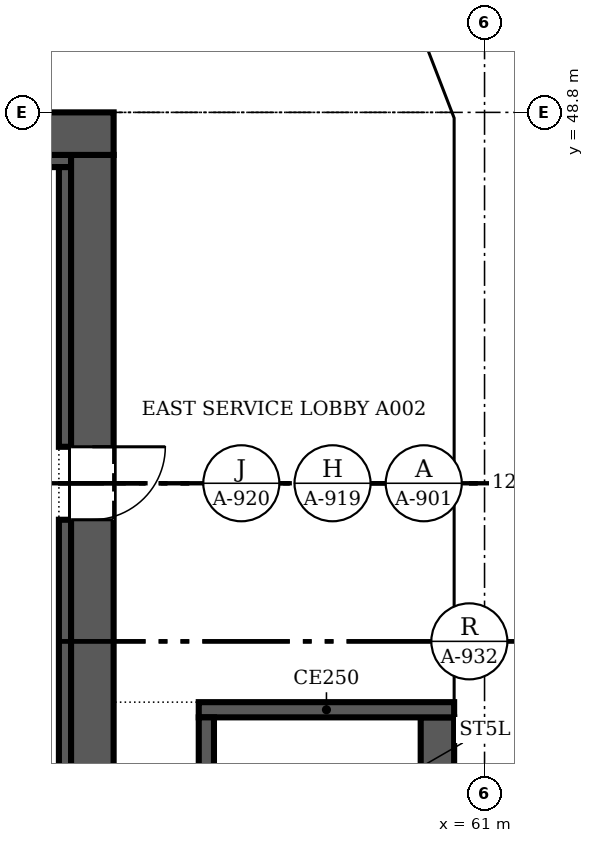
"""IFC4 building model, lengths in metres.
Left out: names, types, materials, properties, quantities, classifications, styles, units other than length and angle.
Written with IfcOpenShell. Run it as: python <this file> out.ifc"""

import sys

from ifc_helpers import new_model, si_unit, direction, frame, frame_2d, origin, place, context, subcontext, project, spatial, polyline, rectangle, outline, extrude, faceted_brep, source, transform, mapped, element, fill, save


model = new_model("IFC4")
c1 = context("Model", 3, precision=1e-05, world=origin(), true_north=direction((0.0, 1.0)))
c2 = subcontext(c1, "Body", "Model", "MODEL_VIEW")
j1 = project(units=[si_unit("LENGTHUNIT", "METRE"), si_unit("PLANEANGLEUNIT", "RADIAN")], contexts=[c1])
p1 = place(None, origin())
s1 = spatial("IfcSite", under=j1, at=p1, CompositionType="ELEMENT")
p2 = place(p1, origin())
s2 = spatial("IfcBuilding", under=s1, at=p2, CompositionType="ELEMENT")
p3 = place(p2, frame((0.0, 0.0, 124.0)))
s3 = spatial("IfcBuildingStorey", under=s2, at=p3, CompositionType="ELEMENT", Elevation=124.0)
m1 = source(origin(), c2, "Body", "Brep", [
    faceted_brep([(3.05, -0.25, 0.0), (6.1, -0.25, 3.8), (6.1, -0.25, 3.8), (3.05, -0.25, 7.6), (0.0, -0.25, 3.8), (0.0, 0.25, 3.8), (3.05, 0.25, 7.6), (6.1, 0.25, 3.8), (6.1, 0.25, 3.8), (3.05, 0.25, 0.0)], [[[0, 1, 2, 3, 4]], [[5, 6, 7, 8, 9]], [[9, 8, 1, 0]], [[7, 6, 3, 2]], [[6, 5, 4, 3]], [[5, 9, 0, 4]], [[1, 8, 7, 2]]]),
])
p4 = place(p3, frame((60.75, 33.55, -3.8), z_axis=(0.0, 0.0, 1.0), x_axis=(0.0, 1.0, 0.0)))
e1 = element("IfcWall", 1, at=p4, inside=s3, PredefinedType="SOLIDWALL", context=c2, shape_type="MappedRepresentation", body=[
    mapped(m1, transform((0.0, 0.0, 0.0), scale=1.0)),
])
m2 = source(origin(), c2, "Body", "SweptSolid", [
    extrude(outline(polyline([(3.05, 0.399), (5.78, 3.8), (3.05, 7.201), (0.321, 3.8), (3.05, 0.399)])), frame((0.0, 0.26, 0.0), z_axis=(0.0, -1.0, 0.0), x_axis=(1.0, 0.0, 0.0)), (0.0, 0.0, 1.0), 0.52),
])
p5 = place(p4, origin())
e2 = element("IfcOpeningElement", 2, at=p5, cuts=e1, PredefinedType="OPENING", context=c2, shape_type="MappedRepresentation", body=[
    mapped(m2, transform((0.0, 0.0, 0.0), scale=1.0)),
])
m3 = source(origin(), c2, "Body", "SweptSolid", [
    extrude(outline(polyline([(3.05, 0.0), (6.1, 3.8), (3.05, 7.6), (0.0, 3.8), (3.05, 0.0)])), frame((0.0, 0.25, 0.0), z_axis=(0.0, -1.0, 0.0), x_axis=(1.0, 0.0, 0.0)), (0.0, 0.0, 1.0), 0.5),
])
p6 = place(p3, frame((60.75, 39.65, -3.8), z_axis=(0.0, 0.0, 1.0), x_axis=(0.0, 1.0, 0.0)))
e3 = element("IfcWall", 3, at=p6, inside=s3, PredefinedType="SOLIDWALL", context=c2, shape_type="MappedRepresentation", body=[
    mapped(m3, transform((0.0, 0.0, 0.0), scale=1.0)),
])
p7 = place(p6, origin())
e4 = element("IfcOpeningElement", 4, at=p7, cuts=e3, PredefinedType="OPENING", context=c2, shape_type="MappedRepresentation", body=[
    mapped(m2, transform((0.0, 0.0, 0.0), scale=1.0)),
])
m4 = source(origin(), c2, "Body", "Brep", [
    faceted_brep([(3.003, -0.25, 0.0), (3.05, -0.25, 0.06), (3.05, -0.25, 7.54), (3.003, -0.25, 7.6), (0.0, -0.25, 3.8), (0.0, 0.25, 3.8), (2.957, 0.25, 7.541), (2.957, 0.25, 0.059), (3.003, 0.0, 0.0), (3.003, 0.0, 7.6)], [[[0, 1, 2, 3, 4]], [[5, 6, 7]], [[1, 0, 8]], [[9, 3, 2]], [[6, 5, 4, 3, 9]], [[5, 7, 8, 0, 4]], [[1, 8, 7, 6, 9, 2]]]),
])
p8 = place(p3, frame((60.75, 45.75, -3.8), z_axis=(0.0, 0.0, 1.0), x_axis=(0.0, 1.0, 0.0)))
e5 = element("IfcWall", 5, at=p8, inside=s3, PredefinedType="SOLIDWALL", context=c2, shape_type="MappedRepresentation", body=[
    mapped(m4, transform((0.0, 0.0, 0.0), scale=1.0)),
])
m5 = source(origin(), c2, "Body", "SweptSolid", [
    extrude(outline(polyline([(2.803, 6.944), (0.319, 3.8), (2.803, 0.656), (2.803, 6.944)])), frame((0.0, 0.26, 0.0), z_axis=(0.0, -1.0, 0.0), x_axis=(1.0, 0.0, 0.0)), (0.0, 0.0, 1.0), 0.52),
])
p9 = place(p8, origin())
e6 = element("IfcOpeningElement", 6, at=p9, cuts=e5, PredefinedType="OPENING", context=c2, shape_type="MappedRepresentation", body=[
    mapped(m5, transform((0.0, 0.0, 0.0), scale=1.0)),
])
m6 = source(origin(), c2, "Body", "Brep", [
    faceted_brep([(0.047, -0.25, 0.0), (2.997, -0.25, 3.8), (0.047, -0.25, 7.6), (0.0, -0.25, 7.541), (0.0, -0.25, 0.059), (0.093, 0.25, 7.54), (2.944, 0.25, 3.868), (2.944, 0.25, 3.732), (0.093, 0.25, 0.06), (2.997, 0.0, 3.8), (0.047, 0.0, 0.0), (0.047, 0.0, 7.6)], [[[0, 1, 2, 3, 4]], [[5, 6, 7, 8]], [[8, 7, 9, 1, 0, 10]], [[6, 5, 11, 2, 1, 9]], [[3, 2, 11]], [[10, 0, 4]], [[8, 10, 4, 3, 11, 5]], [[9, 7, 6]]]),
])
p10 = place(p3, frame((60.767, 48.71, -3.8), z_axis=(0.0, 0.0, 1.0), x_axis=(-0.359901446078, 0.932990326376, 0.0)))
e7 = element("IfcWall", 7, at=p10, inside=s3, PredefinedType="SOLIDWALL", context=c2, shape_type="MappedRepresentation", body=[
    mapped(m6, transform((0.0, 0.0, 0.0), scale=1.0)),
])
m7 = source(origin(), c2, "Body", "SweptSolid", [
    extrude(outline(polyline([(0.247, 0.665), (2.681, 3.8), (0.247, 6.935), (0.247, 0.665)])), frame((0.0, 0.26, 0.0), z_axis=(0.0, -1.0, 0.0), x_axis=(1.0, 0.0, 0.0)), (0.0, 0.0, 1.0), 0.52),
])
p11 = place(p10, origin())
e8 = element("IfcOpeningElement", 8, at=p11, cuts=e7, PredefinedType="OPENING", context=c2, shape_type="MappedRepresentation", body=[
    mapped(m7, transform((0.0, 0.0, 0.0), scale=1.0)),
])
p12 = place(p2, frame((0.0, 0.0, 127.8)))
s4 = spatial("IfcBuildingStorey", under=s2, at=p12, CompositionType="ELEMENT", Elevation=127.8)
p13 = place(p12, frame((60.75, 36.6, -3.8), z_axis=(0.0, 0.0, 1.0), x_axis=(0.0, 1.0, 0.0)))
e9 = element("IfcWall", 9, at=p13, inside=s4, PredefinedType="SOLIDWALL", context=c2, shape_type="MappedRepresentation", body=[
    mapped(m1, transform((0.0, 0.0, 0.0), scale=1.0)),
])
p14 = place(p13, origin())
e10 = element("IfcOpeningElement", 10, at=p14, cuts=e9, PredefinedType="OPENING", context=c2, shape_type="MappedRepresentation", body=[
    mapped(m2, transform((0.0, 0.0, 0.0), scale=1.0)),
])
m8 = source(origin(), c2, "Body", "Brep", [
    faceted_brep([(3.05, -0.25, 0.0), (6.053, -0.25, 3.8), (3.05, -0.25, 7.6), (0.0, -0.25, 3.8), (0.0, 0.25, 3.8), (3.05, 0.25, 7.6), (6.007, 0.25, 3.859), (6.007, 0.25, 3.741), (3.05, 0.25, 0.0), (6.053, 0.0, 3.8)], [[[0, 1, 2, 3]], [[4, 5, 6, 7, 8]], [[8, 7, 9, 1, 0]], [[6, 5, 2, 1, 9]], [[5, 4, 3, 2]], [[4, 8, 0, 3]], [[9, 7, 6]]]),
])
p15 = place(p12, frame((60.75, 42.7, -3.8), z_axis=(0.0, 0.0, 1.0), x_axis=(0.0, 1.0, 0.0)))
e11 = element("IfcWall", 11, at=p15, inside=s4, PredefinedType="SOLIDWALL", context=c2, shape_type="MappedRepresentation", body=[
    mapped(m8, transform((0.0, 0.0, 0.0), scale=1.0)),
])
m9 = source(origin(), c2, "Body", "SweptSolid", [
    extrude(outline(polyline([(3.049, 0.401), (5.735, 3.8), (3.049, 7.199), (0.321, 3.8), (3.049, 0.401)])), frame((0.0, 0.26, 0.0), z_axis=(0.0, -1.0, 0.0), x_axis=(1.0, 0.0, 0.0)), (0.0, 0.0, 1.0), 0.52),
])
p16 = place(p15, origin())
e12 = element("IfcOpeningElement", 12, at=p16, cuts=e11, PredefinedType="OPENING", context=c2, shape_type="MappedRepresentation", body=[
    mapped(m9, transform((0.0, 0.0, 0.0), scale=1.0)),
])
m10 = source(origin(), c2, "Body", "Brep", [
    faceted_brep([(2.95, -0.25, 0.0), (3.003, -0.25, 0.068), (3.003, -0.25, 7.532), (2.95, -0.25, 7.6), (0.0, -0.25, 3.8), (0.047, 0.25, 3.86), (2.898, 0.25, 7.532), (2.898, 0.25, 0.068), (0.047, 0.25, 3.74), (2.95, 0.0, 0.0), (2.95, 0.0, 7.6), (0.0, 0.0, 3.8)], [[[0, 1, 2, 3, 4]], [[5, 6, 7, 8]], [[1, 0, 9]], [[10, 3, 2]], [[6, 5, 11, 4, 3, 10]], [[8, 7, 9, 0, 4, 11]], [[8, 11, 5]], [[1, 9, 7, 6, 10, 2]]]),
])
p17 = place(p12, frame((60.75, 48.753, -3.8), z_axis=(0.0, 0.0, 1.0), x_axis=(-0.35992665181, 0.932980602862, 0.0)))
e13 = element("IfcWall", 13, at=p17, inside=s4, PredefinedType="SOLIDWALL", context=c2, shape_type="MappedRepresentation", body=[
    mapped(m10, transform((0.0, 0.0, 0.0), scale=1.0)),
])
m11 = source(origin(), c2, "Body", "SweptSolid", [
    extrude(outline(polyline([(2.75, 6.935), (0.316, 3.8), (2.75, 0.665), (2.75, 6.935)])), frame((0.0, 0.26, 0.0), z_axis=(0.0, -1.0, 0.0), x_axis=(1.0, 0.0, 0.0)), (0.0, 0.0, 1.0), 0.52),
])
p18 = place(p17, origin())
e14 = element("IfcOpeningElement", 14, at=p18, cuts=e13, PredefinedType="OPENING", context=c2, shape_type="MappedRepresentation", body=[
    mapped(m11, transform((0.0, 0.0, 0.0), scale=1.0)),
])
p19 = place(p3, frame((30.5, 48.45, 0.0), z_axis=(0.0, 0.0, 1.0), x_axis=(1.0, 0.0, 0.0)))
e15 = element("IfcWall", 15, at=p19, inside=s3, PredefinedType="SHEAR", context=c2, shape_type="SweptSolid", body=[
    extrude(rectangle(XDim=24.4, YDim=0.7, at=frame_2d((12.2, 0.0))), origin(), (0.0, 0.0, 1.0), 3.8),
])
p20 = place(p3, frame((54.55, 48.1, 0.0), z_axis=(0.0, 0.0, 1.0), x_axis=(0.0, -1.0, 0.0)))
e16 = element("IfcWall", 16, at=p20, inside=s3, PredefinedType="SHEAR", context=c2, shape_type="SweptSolid", body=[
    extrude(rectangle(XDim=23.0, YDim=0.7, at=frame_2d((11.5, 0.0))), origin(), (0.0, 0.0, 1.0), 3.8),
])
m12 = source(origin(), c2, "Body", "SweptSolid", [
    extrude(rectangle(XDim=1.2, YDim=2.1, at=frame_2d((0.6, 1.05))), frame((0.0, 0.36, 0.0), z_axis=(0.0, -1.0, 0.0), x_axis=(1.0, 0.0, 0.0)), (0.0, 0.0, 1.0), 0.72),
])
p21 = place(p20, frame((4.8, 0.0, 0.0)))
e17 = element("IfcOpeningElement", 17, at=p21, cuts=e16, PredefinedType="OPENING", context=c2, shape_type="MappedRepresentation", body=[
    mapped(m12, transform((0.0, 0.0, 0.0), scale=1.0)),
])
p22 = place(p3, frame((31.2, 48.0, 0.0), z_axis=(0.0, 0.0, 1.0), x_axis=(1.0, 0.0, 0.0)))
e18 = element("IfcWall", 18, at=p22, inside=s3, PredefinedType="SOLIDWALL", context=c2, shape_type="SweptSolid", body=[
    extrude(rectangle(XDim=23.0, YDim=0.2, at=frame_2d((11.5, 0.0))), origin(), (0.0, 0.0, 1.0), 3.8),
])
p23 = place(p3, frame((54.1, 36.88, 0.0), z_axis=(0.0, 0.0, 1.0), x_axis=(0.0, 1.0, 0.0)))
e19 = element("IfcWall", 19, at=p23, inside=s3, PredefinedType="SOLIDWALL", context=c2, shape_type="SweptSolid", body=[
    extrude(rectangle(XDim=5.22, YDim=0.2, at=frame_2d((2.61, 0.0))), origin(), (0.0, 0.0, 1.0), 3.8),
])
p24 = place(p3, frame((54.1, 43.3, 0.0), z_axis=(0.0, 0.0, 1.0), x_axis=(0.0, 1.0, 0.0)))
e20 = element("IfcWall", 20, at=p24, inside=s3, PredefinedType="SOLIDWALL", context=c2, shape_type="SweptSolid", body=[
    extrude(rectangle(XDim=4.6, YDim=0.2, at=frame_2d((2.3, 0.0))), origin(), (0.0, 0.0, 1.0), 3.8),
])
p25 = place(p3, frame((56.425, 30.85, 0.0), z_axis=(0.0, 0.0, 1.0), x_axis=(0.0, 1.0, 0.0)))
e21 = element("IfcWall", 21, at=p25, inside=s3, PredefinedType="SOLIDWALL", context=c2, shape_type="SweptSolid", body=[
    extrude(rectangle(XDim=8.0, YDim=0.25, at=frame_2d((4.0, 0.0))), origin(), (0.0, 0.0, 1.0), 3.8),
])
p26 = place(p3, frame((56.3, 38.975, 0.0), z_axis=(0.0, 0.0, 1.0), x_axis=(1.0, 0.0, 0.0)))
e22 = element("IfcWall", 22, at=p26, inside=s3, PredefinedType="SOLIDWALL", context=c2, shape_type="SweptSolid", body=[
    extrude(rectangle(XDim=4.2, YDim=0.25, at=frame_2d((2.1, 0.0))), origin(), (0.0, 0.0, 1.0), 3.8),
])
p27 = place(p3, frame((60.225, 38.85, 0.0), z_axis=(0.0, 0.0, 1.0), x_axis=(0.0, -1.0, 0.0)))
e23 = element("IfcWall", 23, at=p27, inside=s3, PredefinedType="SOLIDWALL", context=c2, shape_type="SweptSolid", body=[
    extrude(rectangle(XDim=8.0, YDim=0.55, at=frame_2d((4.0, 0.0))), origin(), (0.0, 0.0, 1.0), 3.8),
])
m13 = source(origin(), c2, "Body", "SweptSolid", [
    extrude(rectangle(XDim=1.2, YDim=2.1, at=frame_2d((0.6, 1.05))), frame((0.0, 0.025, 0.0), z_axis=(0.0, -1.0, 0.0), x_axis=(1.0, 0.0, 0.0)), (0.0, 0.0, 1.0), 0.05),
])
p28 = place(p21, origin())
e24 = element("IfcDoor", 24, at=p28, inside=s3, OperationType="SINGLE_SWING_LEFT", PredefinedType="DOOR", context=c2, shape_type="MappedRepresentation", body=[
    mapped(m13, transform((0.0, 0.0, 0.0), scale=1.0)),
])
fill(e17, e24)
save(model, sys.argv[1])
